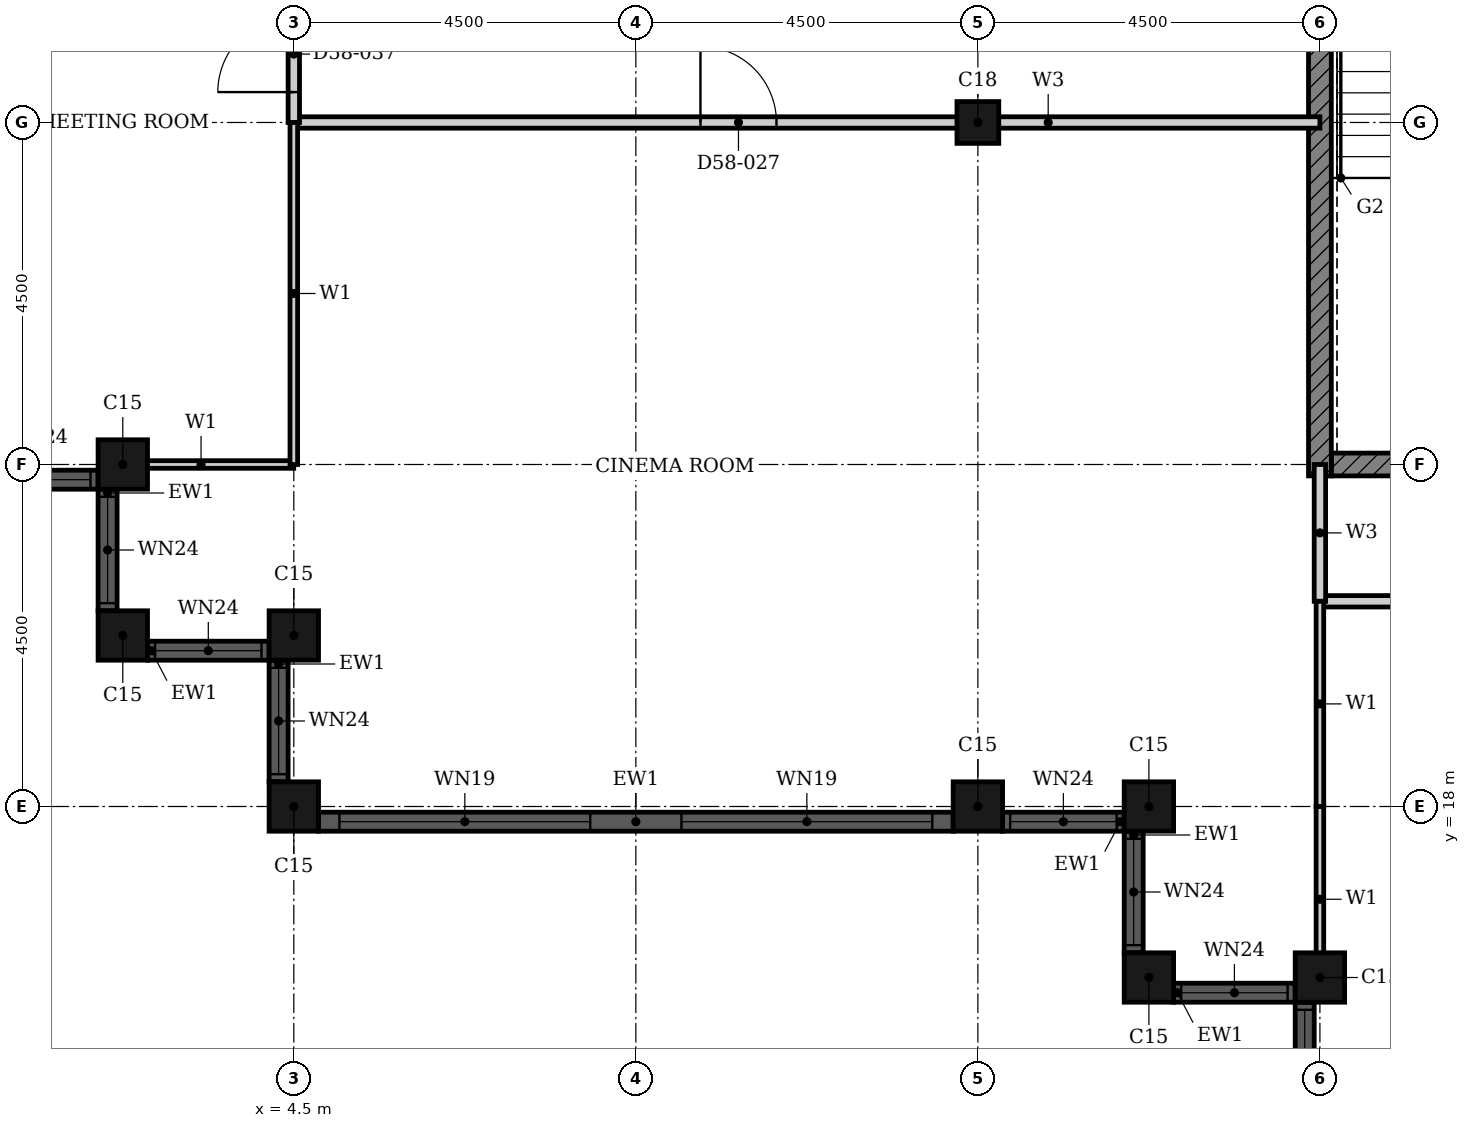
"""IFC4 building model, lengths in metres.
Left out: names, types, materials, properties, quantities, classifications, styles, units other than length and angle.
Written with IfcOpenShell. Run it as: python <this file> out.ifc"""

import sys

from ifc_helpers import new_model, si_unit, direction, frame, frame_2d, origin, origin_2d, place, context, subcontext, project, spatial, rectangle, hollow_rectangle, extrude, element, fill, save


model = new_model("IFC4")
c1 = context("Model", 3, precision=1e-05, world=origin(), true_north=direction((0.0, 1.0)))
c2 = subcontext(c1, "Body", "Model", "MODEL_VIEW")
j1 = project(units=[si_unit("LENGTHUNIT", "METRE"), si_unit("PLANEANGLEUNIT", "RADIAN")], contexts=[c1])
p1 = place(None, origin())
s1 = spatial("IfcSite", under=j1, at=p1, CompositionType="ELEMENT")
p2 = place(p1, origin())
s2 = spatial("IfcBuilding", under=s1, at=p2, CompositionType="ELEMENT")
p3 = place(p2, frame((0.0, 0.0, 229.4)))
s3 = spatial("IfcBuildingStorey", under=s2, at=p3, CompositionType="ELEMENT", Elevation=229.4)
for number, where, z_axis, x_axis in (
    (1, (2.25, 22.5, 0.0), (0.0, 0.0, 1.0), (1.0, 0.0, 0.0)),
    (2, (2.25, 20.25, 0.0), (0.0, 0.0, 1.0), (1.0, 0.0, 0.0)),
    (3, (4.5, 20.25, 0.0), (0.0, 0.0, 1.0), (1.0, 0.0, 0.0)),
    (4, (4.5, 18.0, 0.0), (0.0, 0.0, 1.0), (1.0, 0.0, 0.0)),
    (5, (13.5, 18.0, 0.0), (0.0, 0.0, 1.0), (1.0, 0.0, 0.0)),
    (6, (15.75, 18.0, 0.0), (0.0, 0.0, 1.0), (1.0, 0.0, 0.0)),
    (7, (15.75, 15.75, 0.0), (0.0, 0.0, 1.0), (1.0, 0.0, 0.0)),
    (8, (18.0, 15.75, 0.0), (0.0, 0.0, 1.0), (1.0, 0.0, 0.0)),
):
    element("IfcColumn", number, at=place(p3, frame(where, z_axis=z_axis, x_axis=x_axis)), inside=s3, PredefinedType="COLUMN", context=c2, shape_type="SweptSolid", body=[
        extrude(hollow_rectangle(XDim=0.65, YDim=0.65, WallThickness=0.021, at=origin_2d()), origin(), (0.0, 0.0, 1.0), 3.7),
    ])
p4 = place(p3, frame((13.5, 27.0, 0.0), z_axis=(0.0, 0.0, 1.0), x_axis=(1.0, 0.0, 0.0)))
e9 = element("IfcColumn", 9, at=p4, inside=s3, PredefinedType="COLUMN", context=c2, shape_type="SweptSolid", body=[
    extrude(hollow_rectangle(XDim=0.55, YDim=0.55, WallThickness=0.018, at=origin_2d()), origin(), (0.0, 0.0, 1.0), 3.7),
])
p5 = place(p3, frame((0.325, 22.3, 0.0), z_axis=(0.0, 0.0, 1.0), x_axis=(1.0, 0.0, 0.0)))
e10 = element("IfcWall", 10, at=p5, inside=s3, PredefinedType="SOLIDWALL", context=c2, shape_type="SweptSolid", body=[
    extrude(rectangle(XDim=1.6, YDim=0.25, at=frame_2d((0.8, 0.0))), origin(), (0.0, 0.0, 1.0), 3.7),
])
p6 = place(p5, frame((0.1, 0.0, 0.9)))
e11 = element("IfcOpeningElement", 11, at=p6, cuts=e10, PredefinedType="OPENING", context=c2, shape_type="SweptSolid", body=[
    extrude(rectangle(XDim=1.4, YDim=1.75, at=frame_2d((0.7, 0.875))), frame((0.0, 0.135, 0.0), z_axis=(0.0, -1.0, 0.0), x_axis=(1.0, 0.0, 0.0)), (0.0, 0.0, 1.0), 0.27),
])
p7 = place(p3, frame((2.05, 22.175, 0.0), z_axis=(0.0, 0.0, 1.0), x_axis=(0.0, -1.0, 0.0)))
e12 = element("IfcWall", 12, at=p7, inside=s3, PredefinedType="SOLIDWALL", context=c2, shape_type="SweptSolid", body=[
    extrude(rectangle(XDim=1.6, YDim=0.25, at=frame_2d((0.8, 0.0))), origin(), (0.0, 0.0, 1.0), 3.7),
])
p8 = place(p7, frame((0.1, 0.0, 0.9)))
e13 = element("IfcOpeningElement", 13, at=p8, cuts=e12, PredefinedType="OPENING", context=c2, shape_type="SweptSolid", body=[
    extrude(rectangle(XDim=1.4, YDim=1.75, at=frame_2d((0.7, 0.875))), frame((0.0, 0.135, 0.0), z_axis=(0.0, -1.0, 0.0), x_axis=(1.0, 0.0, 0.0)), (0.0, 0.0, 1.0), 0.27),
])
p9 = place(p3, frame((2.575, 20.05, 0.0), z_axis=(0.0, 0.0, 1.0), x_axis=(1.0, 0.0, 0.0)))
e14 = element("IfcWall", 14, at=p9, inside=s3, PredefinedType="SOLIDWALL", context=c2, shape_type="SweptSolid", body=[
    extrude(rectangle(XDim=1.6, YDim=0.25, at=frame_2d((0.8, 0.0))), origin(), (0.0, 0.0, 1.0), 3.7),
])
p10 = place(p9, frame((0.1, 0.0, 0.9)))
e15 = element("IfcOpeningElement", 15, at=p10, cuts=e14, PredefinedType="OPENING", context=c2, shape_type="SweptSolid", body=[
    extrude(rectangle(XDim=1.4, YDim=1.75, at=frame_2d((0.7, 0.875))), frame((0.0, 0.135, 0.0), z_axis=(0.0, -1.0, 0.0), x_axis=(1.0, 0.0, 0.0)), (0.0, 0.0, 1.0), 0.27),
])
p11 = place(p3, frame((4.3, 19.925, 0.0), z_axis=(0.0, 0.0, 1.0), x_axis=(0.0, -1.0, 0.0)))
e16 = element("IfcWall", 16, at=p11, inside=s3, PredefinedType="SOLIDWALL", context=c2, shape_type="SweptSolid", body=[
    extrude(rectangle(XDim=1.6, YDim=0.25, at=frame_2d((0.8, 0.0))), origin(), (0.0, 0.0, 1.0), 3.7),
])
p12 = place(p11, frame((0.1, 0.0, 0.9)))
e17 = element("IfcOpeningElement", 17, at=p12, cuts=e16, PredefinedType="OPENING", context=c2, shape_type="SweptSolid", body=[
    extrude(rectangle(XDim=1.4, YDim=1.75, at=frame_2d((0.7, 0.875))), frame((0.0, 0.135, 0.0), z_axis=(0.0, -1.0, 0.0), x_axis=(1.0, 0.0, 0.0)), (0.0, 0.0, 1.0), 0.27),
])
p13 = place(p3, frame((4.825, 17.8, 0.0), z_axis=(0.0, 0.0, 1.0), x_axis=(1.0, 0.0, 0.0)))
e18 = element("IfcWall", 18, at=p13, inside=s3, PredefinedType="SOLIDWALL", context=c2, shape_type="SweptSolid", body=[
    extrude(rectangle(XDim=8.35, YDim=0.25, at=frame_2d((4.175, 0.0))), origin(), (0.0, 0.0, 1.0), 3.7),
])
p14 = place(p13, frame((0.275, 0.0, 0.45)))
e19 = element("IfcOpeningElement", 19, at=p14, cuts=e18, PredefinedType="OPENING", context=c2, shape_type="SweptSolid", body=[
    extrude(rectangle(XDim=3.3, YDim=2.2, at=frame_2d((1.65, 1.1))), frame((0.0, 0.135, 0.0), z_axis=(0.0, -1.0, 0.0), x_axis=(1.0, 0.0, 0.0)), (0.0, 0.0, 1.0), 0.27),
])
p15 = place(p13, frame((4.775, 0.0, 0.45)))
e20 = element("IfcOpeningElement", 20, at=p15, cuts=e18, PredefinedType="OPENING", context=c2, shape_type="SweptSolid", body=[
    extrude(rectangle(XDim=3.3, YDim=2.2, at=frame_2d((1.65, 1.1))), frame((0.0, 0.135, 0.0), z_axis=(0.0, -1.0, 0.0), x_axis=(1.0, 0.0, 0.0)), (0.0, 0.0, 1.0), 0.27),
])
p16 = place(p3, frame((13.825, 17.8, 0.0), z_axis=(0.0, 0.0, 1.0), x_axis=(1.0, 0.0, 0.0)))
e21 = element("IfcWall", 21, at=p16, inside=s3, PredefinedType="SOLIDWALL", context=c2, shape_type="SweptSolid", body=[
    extrude(rectangle(XDim=1.6, YDim=0.25, at=frame_2d((0.8, 0.0))), origin(), (0.0, 0.0, 1.0), 3.7),
])
p17 = place(p16, frame((0.1, 0.0, 0.9)))
e22 = element("IfcOpeningElement", 22, at=p17, cuts=e21, PredefinedType="OPENING", context=c2, shape_type="SweptSolid", body=[
    extrude(rectangle(XDim=1.4, YDim=1.75, at=frame_2d((0.7, 0.875))), frame((0.0, 0.135, 0.0), z_axis=(0.0, -1.0, 0.0), x_axis=(1.0, 0.0, 0.0)), (0.0, 0.0, 1.0), 0.27),
])
p18 = place(p3, frame((15.55, 17.675, 0.0), z_axis=(0.0, 0.0, 1.0), x_axis=(0.0, -1.0, 0.0)))
e23 = element("IfcWall", 23, at=p18, inside=s3, PredefinedType="SOLIDWALL", context=c2, shape_type="SweptSolid", body=[
    extrude(rectangle(XDim=1.6, YDim=0.25, at=frame_2d((0.8, 0.0))), origin(), (0.0, 0.0, 1.0), 3.7),
])
p19 = place(p18, frame((0.1, 0.0, 0.9)))
e24 = element("IfcOpeningElement", 24, at=p19, cuts=e23, PredefinedType="OPENING", context=c2, shape_type="SweptSolid", body=[
    extrude(rectangle(XDim=1.4, YDim=1.75, at=frame_2d((0.7, 0.875))), frame((0.0, 0.135, 0.0), z_axis=(0.0, -1.0, 0.0), x_axis=(1.0, 0.0, 0.0)), (0.0, 0.0, 1.0), 0.27),
])
p20 = place(p3, frame((16.075, 15.55, 0.0), z_axis=(0.0, 0.0, 1.0), x_axis=(1.0, 0.0, 0.0)))
e25 = element("IfcWall", 25, at=p20, inside=s3, PredefinedType="SOLIDWALL", context=c2, shape_type="SweptSolid", body=[
    extrude(rectangle(XDim=1.6, YDim=0.25, at=frame_2d((0.8, 0.0))), origin(), (0.0, 0.0, 1.0), 3.7),
])
p21 = place(p20, frame((0.1, 0.0, 0.9)))
e26 = element("IfcOpeningElement", 26, at=p21, cuts=e25, PredefinedType="OPENING", context=c2, shape_type="SweptSolid", body=[
    extrude(rectangle(XDim=1.4, YDim=1.75, at=frame_2d((0.7, 0.875))), frame((0.0, 0.135, 0.0), z_axis=(0.0, -1.0, 0.0), x_axis=(1.0, 0.0, 0.0)), (0.0, 0.0, 1.0), 0.27),
])
p22 = place(p3, frame((17.8, 15.425, 0.0), z_axis=(0.0, 0.0, 1.0), x_axis=(0.0, -1.0, 0.0)))
e27 = element("IfcWall", 27, at=p22, inside=s3, PredefinedType="SOLIDWALL", context=c2, shape_type="SweptSolid", body=[
    extrude(rectangle(XDim=1.6, YDim=0.25, at=frame_2d((0.8, 0.0))), origin(), (0.0, 0.0, 1.0), 3.7),
])
p23 = place(p22, frame((0.1, 0.0, 0.9)))
e28 = element("IfcOpeningElement", 28, at=p23, cuts=e27, PredefinedType="OPENING", context=c2, shape_type="SweptSolid", body=[
    extrude(rectangle(XDim=1.4, YDim=1.75, at=frame_2d((0.7, 0.875))), frame((0.0, 0.135, 0.0), z_axis=(0.0, -1.0, 0.0), x_axis=(1.0, 0.0, 0.0)), (0.0, 0.0, 1.0), 0.27),
])
p24 = place(p3, frame((18.15, 22.5, 0.0), z_axis=(0.0, 0.0, 1.0), x_axis=(1.0, 0.0, 0.0)))
e29 = element("IfcWall", 29, at=p24, inside=s3, PredefinedType="SHEAR", context=c2, shape_type="SweptSolid", body=[
    extrude(rectangle(XDim=4.225, YDim=0.3, at=frame_2d((2.113, 0.0))), origin(), (0.0, 0.0, 1.0), 3.3),
])
p25 = place(p3, frame((18.0, 22.35, 0.0), z_axis=(0.0, 0.0, 1.0), x_axis=(0.0, 1.0, 0.0)))
e30 = element("IfcWall", 30, at=p25, inside=s3, PredefinedType="SHEAR", context=c2, shape_type="SweptSolid", body=[
    extrude(rectangle(XDim=9.3, YDim=0.3, at=frame_2d((4.65, 0.0))), origin(), (0.0, 0.0, 1.0), 3.3),
])
p26 = place(p3, frame((18.0, 20.7, 0.0), z_axis=(0.0, 0.0, 1.0), x_axis=(1.0, 0.0, 0.0)))
e31 = element("IfcWall", 31, at=p26, inside=s3, PredefinedType="PARTITIONING", context=c2, shape_type="SweptSolid", body=[
    extrude(rectangle(XDim=13.5, YDim=0.15, at=frame_2d((6.75, 0.0))), origin(), (0.0, 0.0, 1.0), 3.3),
])
p27 = place(p26, frame((6.25, 0.0, 0.0)))
e32 = element("IfcOpeningElement", 32, at=p27, cuts=e31, PredefinedType="OPENING", context=c2, shape_type="SweptSolid", body=[
    extrude(rectangle(XDim=1.0, YDim=2.1, at=frame_2d((0.5, 1.05))), frame((0.0, 0.085, 0.0), z_axis=(0.0, -1.0, 0.0), x_axis=(1.0, 0.0, 0.0)), (0.0, 0.0, 1.0), 0.17),
])
p28 = place(p3, frame((4.5, 27.0, 0.0), z_axis=(0.0, 0.0, 1.0), x_axis=(1.0, 0.0, 0.0)))
e33 = element("IfcWall", 33, at=p28, inside=s3, PredefinedType="PARTITIONING", context=c2, shape_type="SweptSolid", body=[
    extrude(rectangle(XDim=13.5, YDim=0.15, at=frame_2d((6.75, 0.0))), origin(), (0.0, 0.0, 1.0), 2.58),
])
p29 = place(p28, frame((5.35, 0.0, 0.0)))
e34 = element("IfcOpeningElement", 34, at=p29, cuts=e33, PredefinedType="OPENING", context=c2, shape_type="SweptSolid", body=[
    extrude(rectangle(XDim=1.0, YDim=2.1, at=frame_2d((0.5, 1.05))), frame((0.0, 0.085, 0.0), z_axis=(0.0, -1.0, 0.0), x_axis=(1.0, 0.0, 0.0)), (0.0, 0.0, 1.0), 0.17),
])
p30 = place(p3, frame((18.0, 20.7, 0.0), z_axis=(0.0, 0.0, 1.0), x_axis=(0.0, 1.0, 0.0)))
e35 = element("IfcWall", 35, at=p30, inside=s3, PredefinedType="PARTITIONING", context=c2, shape_type="SweptSolid", body=[
    extrude(rectangle(XDim=1.8, YDim=0.15, at=frame_2d((0.9, 0.0))), origin(), (0.0, 0.0, 1.0), 3.3),
])
p31 = place(p3, frame((4.5, 27.0, 0.0), z_axis=(0.0, 0.0, 1.0), x_axis=(0.0, 1.0, 0.0)))
e36 = element("IfcWall", 36, at=p31, inside=s3, PredefinedType="PARTITIONING", context=c2, shape_type="SweptSolid", body=[
    extrude(rectangle(XDim=1.8, YDim=0.15, at=frame_2d((0.9, 0.0))), origin(), (0.0, 0.0, 1.0), 3.3),
])
p32 = place(p31, frame((0.4, 0.0, 0.0)))
e37 = element("IfcOpeningElement", 37, at=p32, cuts=e36, PredefinedType="OPENING", context=c2, shape_type="SweptSolid", body=[
    extrude(rectangle(XDim=1.0, YDim=2.1, at=frame_2d((0.5, 1.05))), frame((0.0, 0.085, 0.0), z_axis=(0.0, -1.0, 0.0), x_axis=(1.0, 0.0, 0.0)), (0.0, 0.0, 1.0), 0.17),
])
p33 = place(p3, frame((2.06, 22.5, 0.0), z_axis=(0.0, 0.0, 1.0), x_axis=(1.0, 0.0, 0.0)))
e38 = element("IfcWall", 38, at=p33, inside=s3, PredefinedType="PARTITIONING", context=c2, shape_type="SweptSolid", body=[
    extrude(rectangle(XDim=2.439, YDim=0.1, at=frame_2d((1.219, 0.0))), origin(), (0.0, 0.0, 1.0), 2.58),
])
p34 = place(p3, frame((18.0, 15.56, 0.0), z_axis=(0.0, 0.0, 1.0), x_axis=(0.0, 1.0, 0.0)))
e39 = element("IfcWall", 39, at=p34, inside=s3, PredefinedType="PARTITIONING", context=c2, shape_type="SweptSolid", body=[
    extrude(rectangle(XDim=2.439, YDim=0.1, at=frame_2d((1.219, 0.0))), origin(), (0.0, 0.0, 1.0), 3.3),
])
p35 = place(p3, frame((18.0, 18.0, 0.0), z_axis=(0.0, 0.0, 1.0), x_axis=(0.0, 1.0, 0.0)))
e40 = element("IfcWall", 40, at=p35, inside=s3, PredefinedType="PARTITIONING", context=c2, shape_type="SweptSolid", body=[
    extrude(rectangle(XDim=2.7, YDim=0.1, at=frame_2d((1.35, 0.0))), origin(), (0.0, 0.0, 1.0), 3.3),
])
p36 = place(p3, frame((4.5, 22.5, 0.0), z_axis=(0.0, 0.0, 1.0), x_axis=(0.0, 1.0, 0.0)))
e41 = element("IfcWall", 41, at=p36, inside=s3, PredefinedType="PARTITIONING", context=c2, shape_type="SweptSolid", body=[
    extrude(rectangle(XDim=4.5, YDim=0.1, at=frame_2d((2.25, 0.0))), origin(), (0.0, 0.0, 1.0), 3.3),
])
p37 = place(p6, origin())
e42 = element("IfcWindow", 42, at=p37, inside=s3, PartitioningType="SINGLE_PANEL", PredefinedType="WINDOW", context=c2, shape_type="SweptSolid", body=[
    extrude(rectangle(XDim=1.4, YDim=1.75, at=frame_2d((0.7, 0.875))), frame((0.0, 0.03, 0.0), z_axis=(0.0, -1.0, 0.0), x_axis=(1.0, 0.0, 0.0)), (0.0, 0.0, 1.0), 0.06),
])
fill(e11, e42)
p38 = place(p8, origin())
e43 = element("IfcWindow", 43, at=p38, inside=s3, PartitioningType="SINGLE_PANEL", PredefinedType="WINDOW", context=c2, shape_type="SweptSolid", body=[
    extrude(rectangle(XDim=1.4, YDim=1.75, at=frame_2d((0.7, 0.875))), frame((0.0, 0.03, 0.0), z_axis=(0.0, -1.0, 0.0), x_axis=(1.0, 0.0, 0.0)), (0.0, 0.0, 1.0), 0.06),
])
fill(e13, e43)
p39 = place(p10, origin())
e44 = element("IfcWindow", 44, at=p39, inside=s3, PartitioningType="SINGLE_PANEL", PredefinedType="WINDOW", context=c2, shape_type="SweptSolid", body=[
    extrude(rectangle(XDim=1.4, YDim=1.75, at=frame_2d((0.7, 0.875))), frame((0.0, 0.03, 0.0), z_axis=(0.0, -1.0, 0.0), x_axis=(1.0, 0.0, 0.0)), (0.0, 0.0, 1.0), 0.06),
])
fill(e15, e44)
p40 = place(p12, origin())
e45 = element("IfcWindow", 45, at=p40, inside=s3, PartitioningType="SINGLE_PANEL", PredefinedType="WINDOW", context=c2, shape_type="SweptSolid", body=[
    extrude(rectangle(XDim=1.4, YDim=1.75, at=frame_2d((0.7, 0.875))), frame((0.0, 0.03, 0.0), z_axis=(0.0, -1.0, 0.0), x_axis=(1.0, 0.0, 0.0)), (0.0, 0.0, 1.0), 0.06),
])
fill(e17, e45)
p41 = place(p14, origin())
e46 = element("IfcWindow", 46, at=p41, inside=s3, PartitioningType="SINGLE_PANEL", PredefinedType="WINDOW", context=c2, shape_type="SweptSolid", body=[
    extrude(rectangle(XDim=3.3, YDim=2.2, at=frame_2d((1.65, 1.1))), frame((0.0, 0.03, 0.0), z_axis=(0.0, -1.0, 0.0), x_axis=(1.0, 0.0, 0.0)), (0.0, 0.0, 1.0), 0.06),
])
fill(e19, e46)
p42 = place(p15, origin())
e47 = element("IfcWindow", 47, at=p42, inside=s3, PartitioningType="SINGLE_PANEL", PredefinedType="WINDOW", context=c2, shape_type="SweptSolid", body=[
    extrude(rectangle(XDim=3.3, YDim=2.2, at=frame_2d((1.65, 1.1))), frame((0.0, 0.03, 0.0), z_axis=(0.0, -1.0, 0.0), x_axis=(1.0, 0.0, 0.0)), (0.0, 0.0, 1.0), 0.06),
])
fill(e20, e47)
p43 = place(p17, origin())
e48 = element("IfcWindow", 48, at=p43, inside=s3, PartitioningType="SINGLE_PANEL", PredefinedType="WINDOW", context=c2, shape_type="SweptSolid", body=[
    extrude(rectangle(XDim=1.4, YDim=1.75, at=frame_2d((0.7, 0.875))), frame((0.0, 0.03, 0.0), z_axis=(0.0, -1.0, 0.0), x_axis=(1.0, 0.0, 0.0)), (0.0, 0.0, 1.0), 0.06),
])
fill(e22, e48)
p44 = place(p19, origin())
e49 = element("IfcWindow", 49, at=p44, inside=s3, PartitioningType="SINGLE_PANEL", PredefinedType="WINDOW", context=c2, shape_type="SweptSolid", body=[
    extrude(rectangle(XDim=1.4, YDim=1.75, at=frame_2d((0.7, 0.875))), frame((0.0, 0.03, 0.0), z_axis=(0.0, -1.0, 0.0), x_axis=(1.0, 0.0, 0.0)), (0.0, 0.0, 1.0), 0.06),
])
fill(e24, e49)
p45 = place(p21, origin())
e50 = element("IfcWindow", 50, at=p45, inside=s3, PartitioningType="SINGLE_PANEL", PredefinedType="WINDOW", context=c2, shape_type="SweptSolid", body=[
    extrude(rectangle(XDim=1.4, YDim=1.75, at=frame_2d((0.7, 0.875))), frame((0.0, 0.03, 0.0), z_axis=(0.0, -1.0, 0.0), x_axis=(1.0, 0.0, 0.0)), (0.0, 0.0, 1.0), 0.06),
])
fill(e26, e50)
p46 = place(p23, origin())
e51 = element("IfcWindow", 51, at=p46, inside=s3, PartitioningType="SINGLE_PANEL", PredefinedType="WINDOW", context=c2, shape_type="SweptSolid", body=[
    extrude(rectangle(XDim=1.4, YDim=1.75, at=frame_2d((0.7, 0.875))), frame((0.0, 0.03, 0.0), z_axis=(0.0, -1.0, 0.0), x_axis=(1.0, 0.0, 0.0)), (0.0, 0.0, 1.0), 0.06),
])
fill(e28, e51)
p47 = place(p29, origin())
e52 = element("IfcDoor", 52, at=p47, inside=s3, OperationType="SINGLE_SWING_LEFT", PredefinedType="DOOR", context=c2, shape_type="SweptSolid", body=[
    extrude(rectangle(XDim=1.0, YDim=2.1, at=frame_2d((0.5, 1.05))), frame((0.0, 0.025, 0.0), z_axis=(0.0, -1.0, 0.0), x_axis=(1.0, 0.0, 0.0)), (0.0, 0.0, 1.0), 0.05),
])
fill(e34, e52)
p48 = place(p32, origin())
e53 = element("IfcDoor", 53, at=p48, inside=s3, OperationType="SINGLE_SWING_LEFT", PredefinedType="DOOR", context=c2, shape_type="SweptSolid", body=[
    extrude(rectangle(XDim=1.0, YDim=2.1, at=frame_2d((0.5, 1.05))), frame((0.0, 0.025, 0.0), z_axis=(0.0, -1.0, 0.0), x_axis=(1.0, 0.0, 0.0)), (0.0, 0.0, 1.0), 0.05),
])
fill(e37, e53)
save(model, sys.argv[1])
